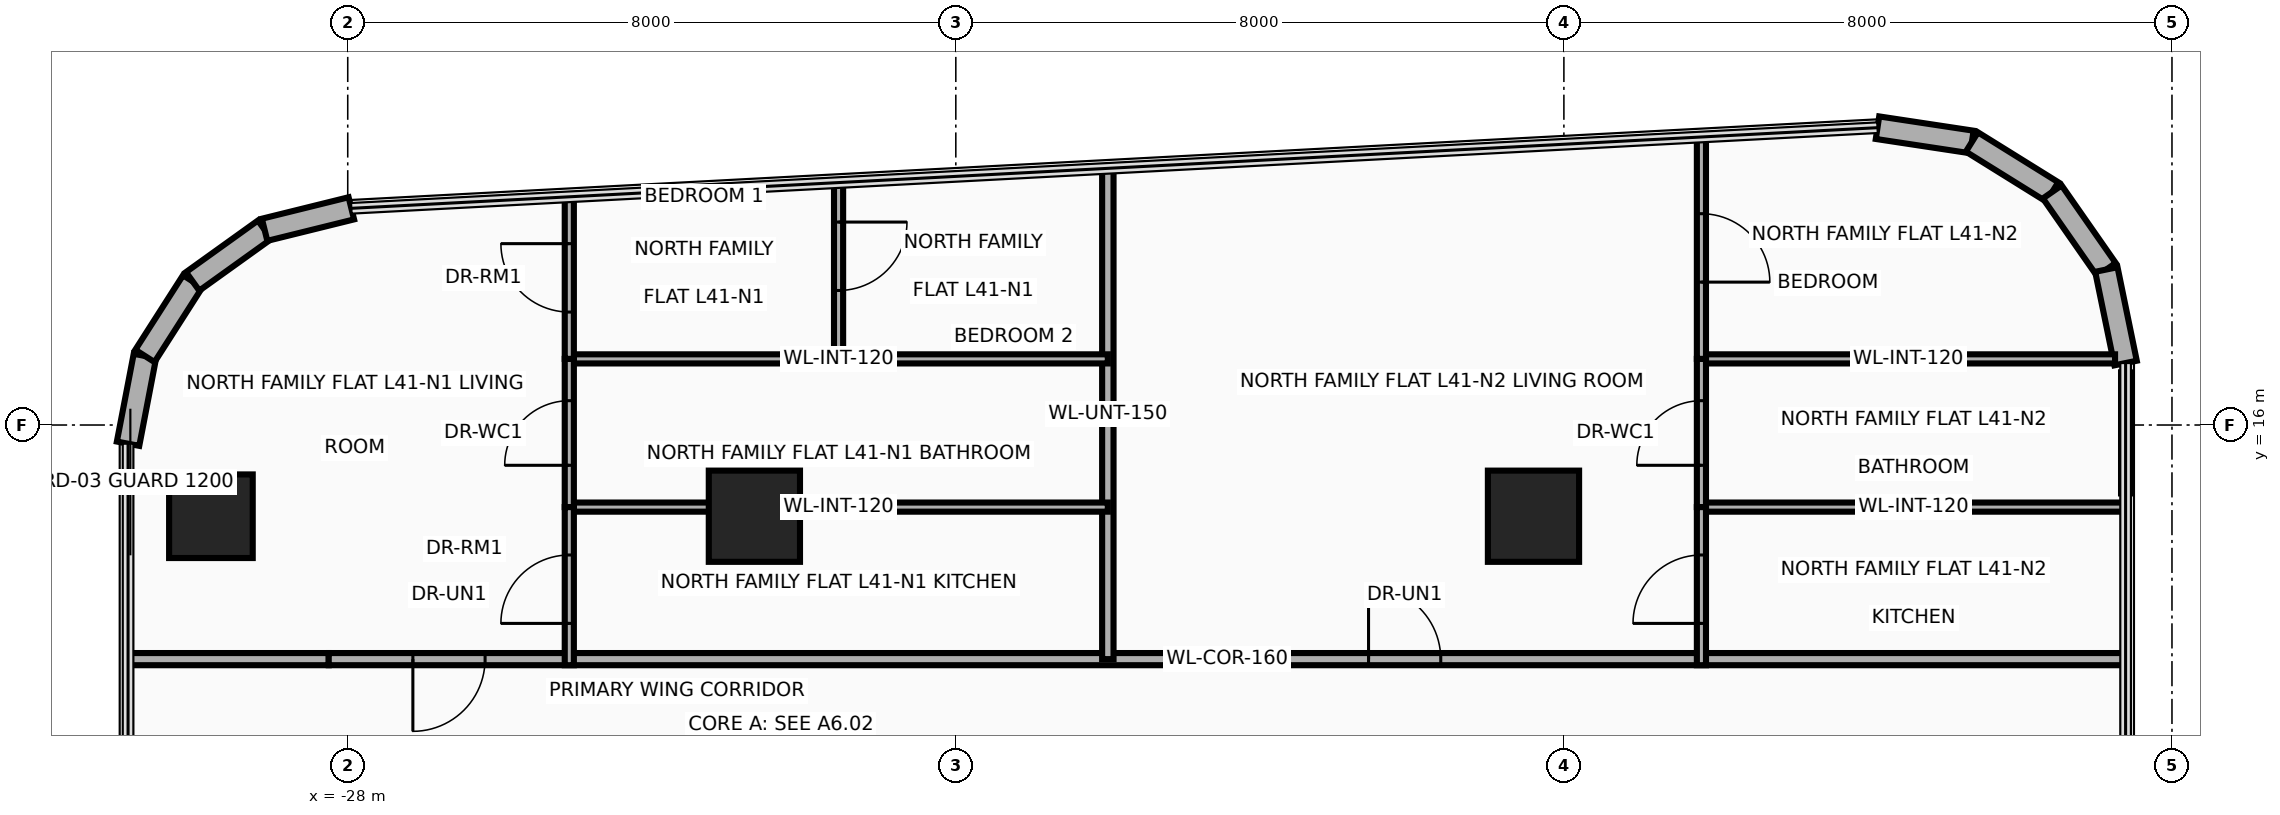
"""IFC4 building model, lengths in metres.
Left out: names, types, materials, properties, quantities, classifications, styles, units other than length and angle.
Written with IfcOpenShell. Run it as: python <this file> out.ifc"""

import sys

from ifc_helpers import new_model, si_unit, direction, frame, frame_2d, origin, origin_2d, place, context, subcontext, project, spatial, rectangle, circle, extrude, source, transform, mapped, element, fill, save


model = new_model("IFC4")
c1 = context("Model", 3, precision=1e-05, world=origin(), true_north=direction((0.0, 1.0)))
c2 = subcontext(c1, "Body", "Model", "MODEL_VIEW")
j1 = project(units=[si_unit("LENGTHUNIT", "METRE"), si_unit("PLANEANGLEUNIT", "RADIAN")], contexts=[c1])
p1 = place(None, origin())
s1 = spatial("IfcSite", under=j1, at=p1, CompositionType="ELEMENT")
p2 = place(p1, origin())
s2 = spatial("IfcBuilding", under=s1, at=p2, CompositionType="ELEMENT")
p3 = place(p2, frame((0.0, 0.0, 161.2)))
s3 = spatial("IfcBuildingStorey", under=s2, at=p3, CompositionType="ELEMENT", Elevation=161.2)
m1 = source(origin(), c2, "Body", "SweptSolid", [
    extrude(circle(Radius=0.55, at=origin_2d()), origin(), (0.0, 0.0, 1.0), 3.7),
])
p4 = place(p3, frame((-29.8, 14.8, 0.0), z_axis=(0.0, 0.0, 1.0), x_axis=(1.0, 0.0, 0.0)))
e1 = element("IfcColumn", 1, at=p4, inside=s3, PredefinedType="COLUMN", context=c2, shape_type="MappedRepresentation", body=[
    mapped(m1, transform((0.0, 0.0, 0.0), x_axis=(1.0, 0.0, 0.0), y_axis=(0.0, 1.0, 0.0), z_axis=(0.0, 0.0, 1.0), scale=1.0)),
])
m2 = source(origin(), c2, "Body", "SweptSolid", [
    extrude(rectangle(XDim=1.2, YDim=1.2, at=origin_2d()), origin(), (0.0, 0.0, 1.0), 3.7),
])
for number, where, z_axis, x_axis in (
    (2, (-22.65, 14.8, 0.0), (0.0, 0.0, 1.0), (1.0, 0.0, 0.0)),
    (3, (-12.4, 14.8, 0.0), (0.0, 0.0, 1.0), (1.0, 0.0, 0.0)),
):
    element("IfcColumn", number, at=place(p3, frame(where, z_axis=z_axis, x_axis=x_axis)), inside=s3, PredefinedType="COLUMN", context=c2, shape_type="MappedRepresentation", body=[
        mapped(m2, transform((0.0, 0.0, 0.0), x_axis=(1.0, 0.0, 0.0), y_axis=(0.0, 1.0, 0.0), z_axis=(0.0, 0.0, 1.0), scale=1.0)),
    ])
p5 = place(p3, frame((-30.89, 15.754, 0.0), z_axis=(0.0, 0.0, 1.0), x_axis=(0.188562397879, 0.982061210977, 0.0)))
e4 = element("IfcWall", 4, at=p5, inside=s3, PredefinedType="SOLIDWALL", context=c2, shape_type="SweptSolid", body=[
    extrude(rectangle(XDim=1.176, YDim=0.3, at=frame_2d((0.588, 0.0))), origin(), (0.0, 0.0, 1.0), 3.46),
])
for number, where, z_axis, x_axis in (
    (5, (-30.668, 16.909, 0.0), (0.0, 0.0, 1.0), (0.539, 0.842, 0.0)),
    (6, (-30.04, 17.89, 0.0), (0.0, 0.0, 1.0), (0.813, 0.583, 0.0)),
):
    element("IfcWall", number, at=place(p3, frame(where, z_axis=z_axis, x_axis=x_axis)), inside=s3, PredefinedType="SOLIDWALL", context=c2, shape_type="SweptSolid", body=[
        extrude(rectangle(XDim=1.165, YDim=0.3, at=frame_2d((0.583, 0.0))), origin(), (0.0, 0.0, 1.0), 3.46),
    ])
p6 = place(p3, frame((-29.094, 18.569, 0.0), z_axis=(0.0, 0.0, 1.0), x_axis=(0.970762249107, 0.24004302887, 0.0)))
e7 = element("IfcWall", 7, at=p6, inside=s3, PredefinedType="SOLIDWALL", context=c2, shape_type="SweptSolid", body=[
    extrude(rectangle(XDim=1.176, YDim=0.3, at=frame_2d((0.588, 0.0))), origin(), (0.0, 0.0, 1.0), 3.46),
])
p7 = place(p3, frame((-7.874, 19.912, 0.0), z_axis=(0.0, 0.0, 1.0), x_axis=(0.988741655411, -0.149632679769, 0.0)))
e8 = element("IfcWall", 8, at=p7, inside=s3, PredefinedType="SOLIDWALL", context=c2, shape_type="SweptSolid", body=[
    extrude(rectangle(XDim=1.256, YDim=0.3, at=frame_2d((0.628, 0.0))), origin(), (0.0, 0.0, 1.0), 3.46),
])
p8 = place(p3, frame((-6.632, 19.724, 0.0), z_axis=(0.0, 0.0, 1.0), x_axis=(0.849285325289, -0.527934121126, 0.0)))
e9 = element("IfcWall", 9, at=p8, inside=s3, PredefinedType="SOLIDWALL", context=c2, shape_type="SweptSolid", body=[
    extrude(rectangle(XDim=1.244, YDim=0.3, at=frame_2d((0.622, 0.0))), origin(), (0.0, 0.0, 1.0), 3.46),
])
p9 = place(p3, frame((-5.575, 19.067, 0.0), z_axis=(0.0, 0.0, 1.0), x_axis=(0.571960670617, -0.820281044074, 0.0)))
e10 = element("IfcWall", 10, at=p9, inside=s3, PredefinedType="SOLIDWALL", context=c2, shape_type="SweptSolid", body=[
    extrude(rectangle(XDim=1.245, YDim=0.3, at=frame_2d((0.622, 0.0))), origin(), (0.0, 0.0, 1.0), 3.46),
])
p10 = place(p3, frame((-4.863, 18.046, 0.0), z_axis=(0.0, 0.0, 1.0), x_axis=(0.201532282172, -0.97948187285, 0.0)))
e11 = element("IfcWall", 11, at=p10, inside=s3, PredefinedType="SOLIDWALL", context=c2, shape_type="SweptSolid", body=[
    extrude(rectangle(XDim=1.256, YDim=0.3, at=frame_2d((0.628, 0.0))), origin(), (0.0, 0.0, 1.0), 3.46),
])
p11 = place(p3, frame((-30.89, 12.92, 0.0), z_axis=(0.0, 0.0, 1.0), x_axis=(1.0, 0.0, 0.0)))
e12 = element("IfcWall", 12, at=p11, inside=s3, PredefinedType="PARTITIONING", context=c2, shape_type="SweptSolid", body=[
    extrude(rectangle(XDim=2.64, YDim=0.16, at=frame_2d((1.32, 0.0))), origin(), (0.0, 0.0, 1.0), 2.896),
])
p12 = place(p3, frame((-28.25, 12.92, 0.0), z_axis=(0.0, 0.0, 1.0), x_axis=(1.0, 0.0, 0.0)))
e13 = element("IfcWall", 13, at=p12, inside=s3, PredefinedType="PARTITIONING", context=c2, shape_type="SweptSolid", body=[
    extrude(rectangle(XDim=23.64, YDim=0.16, at=frame_2d((11.82, 0.0))), origin(), (0.0, 0.0, 1.0), 2.834),
])
p13 = place(p12, frame((1.107, 0.0, 0.0)))
e14 = element("IfcOpeningElement", 14, at=p13, cuts=e13, PredefinedType="OPENING", context=c2, shape_type="SweptSolid", body=[
    extrude(rectangle(XDim=0.95, YDim=2.15, at=frame_2d((0.475, 1.075))), frame((0.0, 0.095, 0.0), z_axis=(0.0, -1.0, 0.0), x_axis=(1.0, 0.0, 0.0)), (0.0, 0.0, 1.0), 0.19),
])
p14 = place(p12, frame((13.68, 0.0, 0.0)))
e15 = element("IfcOpeningElement", 15, at=p14, cuts=e13, PredefinedType="OPENING", context=c2, shape_type="SweptSolid", body=[
    extrude(rectangle(XDim=0.95, YDim=2.15, at=frame_2d((0.475, 1.075))), frame((0.0, 0.095, 0.0), z_axis=(0.0, -1.0, 0.0), x_axis=(1.0, 0.0, 0.0)), (0.0, 0.0, 1.0), 0.19),
])
p15 = place(p3, frame((-18.0, 12.92, 0.0), z_axis=(0.0, 0.0, 1.0), x_axis=(0.0, 1.0, 0.0)))
e16 = element("IfcWall", 16, at=p15, inside=s3, PredefinedType="PARTITIONING", context=c2, shape_type="SweptSolid", body=[
    extrude(rectangle(XDim=6.457, YDim=0.15, at=frame_2d((3.229, 0.0))), origin(), (0.0, 0.0, 1.0), 2.666),
])
p16 = place(p3, frame((-25.085, 14.92, 0.0), z_axis=(0.0, 0.0, 1.0), x_axis=(1.0, 0.0, 0.0)))
e17 = element("IfcWall", 17, at=p16, inside=s3, PredefinedType="PARTITIONING", context=c2, shape_type="SweptSolid", body=[
    extrude(rectangle(XDim=7.085, YDim=0.12, at=frame_2d((3.542, 0.0))), origin(), (0.0, 0.0, 1.0), 2.666),
])
p17 = place(p3, frame((-25.085, 16.87, 0.0), z_axis=(0.0, 0.0, 1.0), x_axis=(1.0, 0.0, 0.0)))
e18 = element("IfcWall", 18, at=p17, inside=s3, PredefinedType="PARTITIONING", context=c2, shape_type="SweptSolid", body=[
    extrude(rectangle(XDim=7.085, YDim=0.12, at=frame_2d((3.542, 0.0))), origin(), (0.0, 0.0, 1.0), 3.46),
])
p18 = place(p3, frame((-25.085, 14.92, 0.0), z_axis=(0.0, 0.0, 1.0), x_axis=(0.0, 1.0, 0.0)))
e19 = element("IfcWall", 19, at=p18, inside=s3, PredefinedType="PARTITIONING", context=c2, shape_type="SweptSolid", body=[
    extrude(rectangle(XDim=1.95, YDim=0.12, at=frame_2d((0.975, 0.0))), origin(), (0.0, 0.0, 1.0), 2.666),
])
p19 = place(p18, frame((0.55, 0.0, 0.0)))
e20 = element("IfcOpeningElement", 20, at=p19, cuts=e19, PredefinedType="OPENING", context=c2, shape_type="SweptSolid", body=[
    extrude(rectangle(XDim=0.85, YDim=2.1, at=frame_2d((0.425, 1.05))), frame((0.0, 0.075, 0.0), z_axis=(0.0, -1.0, 0.0), x_axis=(1.0, 0.0, 0.0)), (0.0, 0.0, 1.0), 0.15),
])
p20 = place(p3, frame((-25.085, 12.84, 0.0), z_axis=(0.0, 0.0, 1.0), x_axis=(0.0, 1.0, 0.0)))
e21 = element("IfcWall", 21, at=p20, inside=s3, PredefinedType="PARTITIONING", context=c2, shape_type="SweptSolid", body=[
    extrude(rectangle(XDim=2.08, YDim=0.12, at=frame_2d((1.04, 0.0))), origin(), (0.0, 0.0, 1.0), 2.666),
])
p21 = place(p20, frame((0.55, 0.0, 0.0)))
e22 = element("IfcOpeningElement", 22, at=p21, cuts=e21, PredefinedType="OPENING", context=c2, shape_type="SweptSolid", body=[
    extrude(rectangle(XDim=0.9, YDim=2.1, at=frame_2d((0.45, 1.05))), frame((0.0, 0.075, 0.0), z_axis=(0.0, -1.0, 0.0), x_axis=(1.0, 0.0, 0.0)), (0.0, 0.0, 1.0), 0.15),
])
p22 = place(p3, frame((-25.085, 16.87, 0.0), z_axis=(0.0, 0.0, 1.0), x_axis=(0.0, 1.0, 0.0)))
e23 = element("IfcWall", 23, at=p22, inside=s3, PredefinedType="PARTITIONING", context=c2, shape_type="SweptSolid", body=[
    extrude(rectangle(XDim=2.132, YDim=0.12, at=frame_2d((1.066, 0.0))), origin(), (0.0, 0.0, 1.0), 3.46),
])
p23 = place(p22, frame((0.616, 0.0, 0.0)))
e24 = element("IfcOpeningElement", 24, at=p23, cuts=e23, PredefinedType="OPENING", context=c2, shape_type="SweptSolid", body=[
    extrude(rectangle(XDim=0.9, YDim=2.1, at=frame_2d((0.45, 1.05))), frame((0.0, 0.075, 0.0), z_axis=(0.0, -1.0, 0.0), x_axis=(1.0, 0.0, 0.0)), (0.0, 0.0, 1.0), 0.15),
])
p24 = place(p3, frame((-21.542, 16.87, 0.0), z_axis=(0.0, 0.0, 1.0), x_axis=(0.0, 1.0, 0.0)))
e25 = element("IfcWall", 25, at=p24, inside=s3, PredefinedType="PARTITIONING", context=c2, shape_type="SweptSolid", body=[
    extrude(rectangle(XDim=2.319, YDim=0.12, at=frame_2d((1.16, 0.0))), origin(), (0.0, 0.0, 1.0), 3.46),
])
p25 = place(p24, frame((0.9, 0.0, 0.0)))
e26 = element("IfcOpeningElement", 26, at=p25, cuts=e25, PredefinedType="OPENING", context=c2, shape_type="SweptSolid", body=[
    extrude(rectangle(XDim=0.9, YDim=2.1, at=frame_2d((0.45, 1.05))), frame((0.0, 0.075, 0.0), z_axis=(0.0, -1.0, 0.0), x_axis=(1.0, 0.0, 0.0)), (0.0, 0.0, 1.0), 0.15),
])
p26 = place(p3, frame((-10.191, 14.92, 0.0), z_axis=(0.0, 0.0, 1.0), x_axis=(1.0, 0.0, 0.0)))
e27 = element("IfcWall", 27, at=p26, inside=s3, PredefinedType="PARTITIONING", context=c2, shape_type="SweptSolid", body=[
    extrude(rectangle(XDim=5.581, YDim=0.12, at=frame_2d((2.79, 0.0))), origin(), (0.0, 0.0, 1.0), 3.46),
])
p27 = place(p3, frame((-10.191, 16.87, 0.0), z_axis=(0.0, 0.0, 1.0), x_axis=(1.0, 0.0, 0.0)))
e28 = element("IfcWall", 28, at=p27, inside=s3, PredefinedType="PARTITIONING", context=c2, shape_type="SweptSolid", body=[
    extrude(rectangle(XDim=5.442, YDim=0.12, at=frame_2d((2.721, 0.0))), origin(), (0.0, 0.0, 1.0), 3.46),
])
p28 = place(p3, frame((-10.191, 14.92, 0.0), z_axis=(0.0, 0.0, 1.0), x_axis=(0.0, 1.0, 0.0)))
e29 = element("IfcWall", 29, at=p28, inside=s3, PredefinedType="PARTITIONING", context=c2, shape_type="SweptSolid", body=[
    extrude(rectangle(XDim=1.95, YDim=0.12, at=frame_2d((0.975, 0.0))), origin(), (0.0, 0.0, 1.0), 3.46),
])
p29 = place(p28, frame((0.55, 0.0, 0.0)))
e30 = element("IfcOpeningElement", 30, at=p29, cuts=e29, PredefinedType="OPENING", context=c2, shape_type="SweptSolid", body=[
    extrude(rectangle(XDim=0.85, YDim=2.1, at=frame_2d((0.425, 1.05))), frame((0.0, 0.075, 0.0), z_axis=(0.0, -1.0, 0.0), x_axis=(1.0, 0.0, 0.0)), (0.0, 0.0, 1.0), 0.15),
])
p30 = place(p3, frame((-10.191, 12.84, 0.0), z_axis=(0.0, 0.0, 1.0), x_axis=(0.0, 1.0, 0.0)))
e31 = element("IfcWall", 31, at=p30, inside=s3, PredefinedType="PARTITIONING", context=c2, shape_type="SweptSolid", body=[
    extrude(rectangle(XDim=2.08, YDim=0.12, at=frame_2d((1.04, 0.0))), origin(), (0.0, 0.0, 1.0), 3.46),
])
p31 = place(p30, frame((0.55, 0.0, 0.0)))
e32 = element("IfcOpeningElement", 32, at=p31, cuts=e31, PredefinedType="OPENING", context=c2, shape_type="SweptSolid", body=[
    extrude(rectangle(XDim=0.9, YDim=2.1, at=frame_2d((0.45, 1.05))), frame((0.0, 0.075, 0.0), z_axis=(0.0, -1.0, 0.0), x_axis=(1.0, 0.0, 0.0)), (0.0, 0.0, 1.0), 0.15),
])
p32 = place(p3, frame((-10.191, 16.87, 0.0), z_axis=(0.0, 0.0, 1.0), x_axis=(0.0, 1.0, 0.0)))
e33 = element("IfcWall", 33, at=p32, inside=s3, PredefinedType="PARTITIONING", context=c2, shape_type="SweptSolid", body=[
    extrude(rectangle(XDim=2.919, YDim=0.12, at=frame_2d((1.459, 0.0))), origin(), (0.0, 0.0, 1.0), 3.46),
])
p33 = place(p32, frame((1.01, 0.0, 0.0)))
e34 = element("IfcOpeningElement", 34, at=p33, cuts=e33, PredefinedType="OPENING", context=c2, shape_type="SweptSolid", body=[
    extrude(rectangle(XDim=0.9, YDim=2.1, at=frame_2d((0.45, 1.05))), frame((0.0, 0.075, 0.0), z_axis=(0.0, -1.0, 0.0), x_axis=(1.0, 0.0, 0.0)), (0.0, 0.0, 1.0), 0.15),
])
p34 = place(p3, frame((-4.61, 15.1, 0.0), z_axis=(0.0, 0.0, 1.0), x_axis=(0.0, 1.0, 0.0)))
e35 = element("IfcWall", 35, at=p34, inside=s3, PredefinedType="PARTITIONING", context=c2, shape_type="SweptSolid", body=[
    extrude(rectangle(XDim=1.593, YDim=0.12, at=frame_2d((0.796, 0.0))), origin(), (0.0, 0.0, 1.0), 3.46),
])
p35 = place(p13, frame((0.95, 0.0, 0.0), z_axis=(0.0, 0.0, 1.0), x_axis=(-1.0, 0.0, 0.0)))
e36 = element("IfcDoor", 36, at=p35, inside=s3, OperationType="SINGLE_SWING_LEFT", PredefinedType="DOOR", context=c2, shape_type="SweptSolid", body=[
    extrude(rectangle(XDim=0.95, YDim=2.15, at=frame_2d((0.475, 1.075))), frame((0.0, 0.025, 0.0), z_axis=(0.0, -1.0, 0.0), x_axis=(1.0, 0.0, 0.0)), (0.0, 0.0, 1.0), 0.05),
])
fill(e14, e36)
p36 = place(p19, origin())
e37 = element("IfcDoor", 37, at=p36, inside=s3, OperationType="SINGLE_SWING_RIGHT", PredefinedType="DOOR", context=c2, shape_type="SweptSolid", body=[
    extrude(rectangle(XDim=0.85, YDim=2.1, at=frame_2d((0.425, 1.05))), frame((0.0, 0.025, 0.0), z_axis=(0.0, -1.0, 0.0), x_axis=(1.0, 0.0, 0.0)), (0.0, 0.0, 1.0), 0.05),
])
fill(e20, e37)
p37 = place(p21, origin())
e38 = element("IfcDoor", 38, at=p37, inside=s3, OperationType="SINGLE_SWING_LEFT", PredefinedType="DOOR", context=c2, shape_type="SweptSolid", body=[
    extrude(rectangle(XDim=0.9, YDim=2.1, at=frame_2d((0.45, 1.05))), frame((0.0, 0.025, 0.0), z_axis=(0.0, -1.0, 0.0), x_axis=(1.0, 0.0, 0.0)), (0.0, 0.0, 1.0), 0.05),
])
fill(e22, e38)
p38 = place(p23, origin())
e39 = element("IfcDoor", 39, at=p38, inside=s3, OperationType="SINGLE_SWING_RIGHT", PredefinedType="DOOR", context=c2, shape_type="SweptSolid", body=[
    extrude(rectangle(XDim=0.9, YDim=2.1, at=frame_2d((0.45, 1.05))), frame((0.0, 0.025, 0.0), z_axis=(0.0, -1.0, 0.0), x_axis=(1.0, 0.0, 0.0)), (0.0, 0.0, 1.0), 0.05),
])
fill(e24, e39)
p39 = place(p25, frame((0.9, 0.0, 0.0), z_axis=(0.0, 0.0, 1.0), x_axis=(-1.0, 0.0, 0.0)))
e40 = element("IfcDoor", 40, at=p39, inside=s3, OperationType="SINGLE_SWING_LEFT", PredefinedType="DOOR", context=c2, shape_type="SweptSolid", body=[
    extrude(rectangle(XDim=0.9, YDim=2.1, at=frame_2d((0.45, 1.05))), frame((0.0, 0.025, 0.0), z_axis=(0.0, -1.0, 0.0), x_axis=(1.0, 0.0, 0.0)), (0.0, 0.0, 1.0), 0.05),
])
fill(e26, e40)
p40 = place(p14, origin())
e41 = element("IfcDoor", 41, at=p40, inside=s3, OperationType="SINGLE_SWING_RIGHT", PredefinedType="DOOR", context=c2, shape_type="SweptSolid", body=[
    extrude(rectangle(XDim=0.95, YDim=2.15, at=frame_2d((0.475, 1.075))), frame((0.0, 0.025, 0.0), z_axis=(0.0, -1.0, 0.0), x_axis=(1.0, 0.0, 0.0)), (0.0, 0.0, 1.0), 0.05),
])
fill(e15, e41)
p41 = place(p29, origin())
e42 = element("IfcDoor", 42, at=p41, inside=s3, OperationType="SINGLE_SWING_LEFT", PredefinedType="DOOR", context=c2, shape_type="SweptSolid", body=[
    extrude(rectangle(XDim=0.85, YDim=2.1, at=frame_2d((0.425, 1.05))), frame((0.0, 0.025, 0.0), z_axis=(0.0, -1.0, 0.0), x_axis=(1.0, 0.0, 0.0)), (0.0, 0.0, 1.0), 0.05),
])
fill(e30, e42)
p42 = place(p31, origin())
e43 = element("IfcDoor", 43, at=p42, inside=s3, OperationType="SINGLE_SWING_RIGHT", PredefinedType="DOOR", context=c2, shape_type="SweptSolid", body=[
    extrude(rectangle(XDim=0.9, YDim=2.1, at=frame_2d((0.45, 1.05))), frame((0.0, 0.025, 0.0), z_axis=(0.0, -1.0, 0.0), x_axis=(1.0, 0.0, 0.0)), (0.0, 0.0, 1.0), 0.05),
])
fill(e32, e43)
p43 = place(p33, frame((0.9, 0.0, 0.0), z_axis=(0.0, 0.0, 1.0), x_axis=(-1.0, 0.0, 0.0)))
e44 = element("IfcDoor", 44, at=p43, inside=s3, OperationType="SINGLE_SWING_LEFT", PredefinedType="DOOR", context=c2, shape_type="SweptSolid", body=[
    extrude(rectangle(XDim=0.9, YDim=2.1, at=frame_2d((0.45, 1.05))), frame((0.0, 0.025, 0.0), z_axis=(0.0, -1.0, 0.0), x_axis=(1.0, 0.0, 0.0)), (0.0, 0.0, 1.0), 0.05),
])
fill(e34, e44)
save(model, sys.argv[1])
